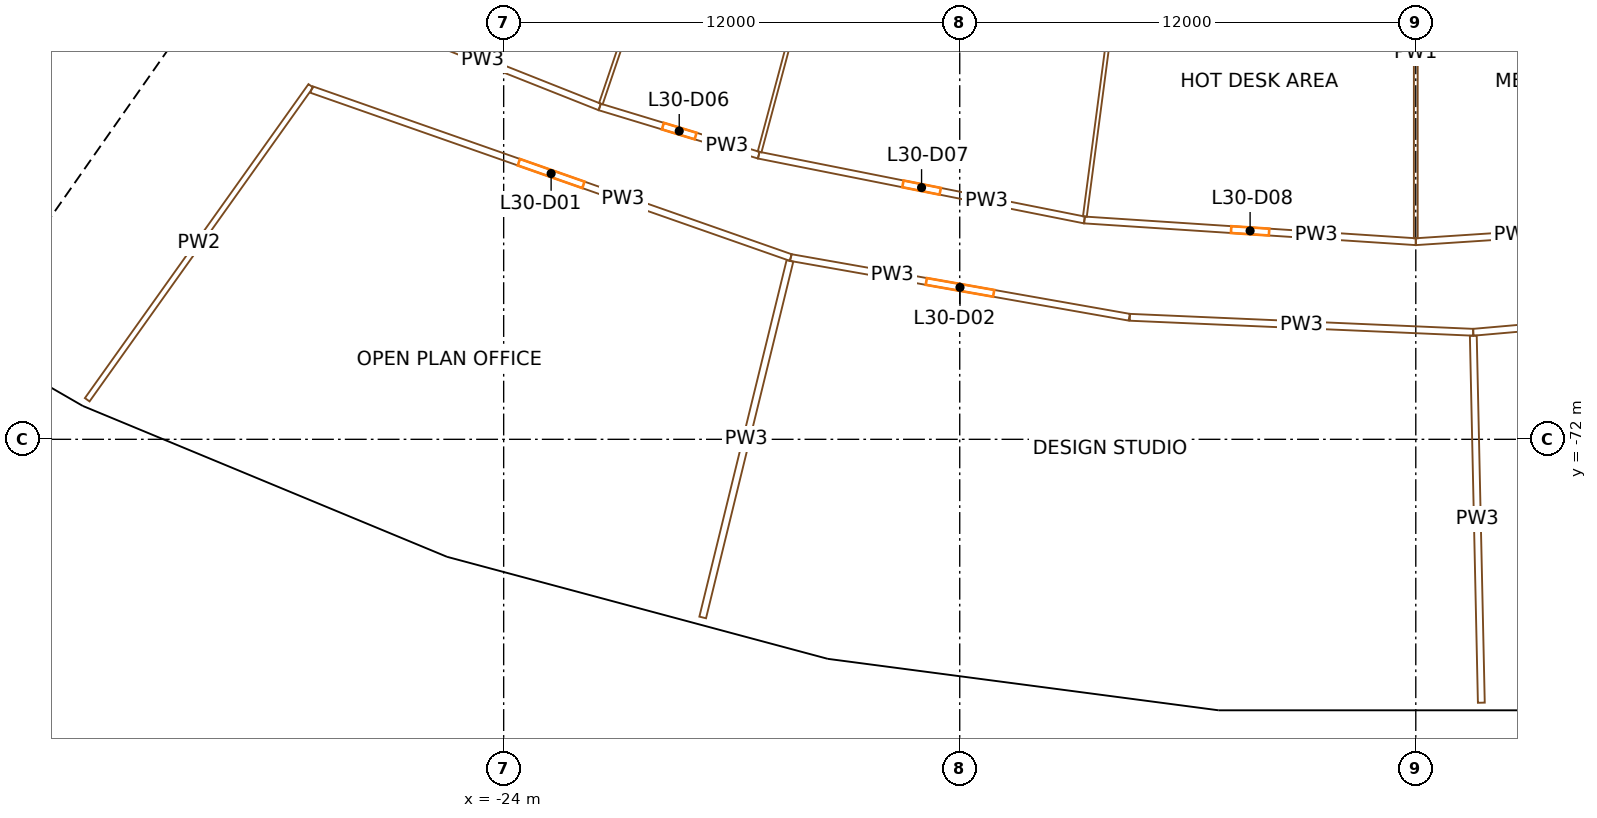
"""IFC4 building model, lengths in metres.
Left out: names, types, materials, properties, quantities, classifications, styles, units other than length and angle.
Written with IfcOpenShell. Run it as: python <this file> out.ifc"""

import sys

from ifc_helpers import new_model, si_unit, direction, frame, frame_2d, origin, origin_2d, place, context, subcontext, project, spatial, rectangle, extrude, element, fill, save


model = new_model("IFC4")
c1 = context("Model", 3, precision=1e-05, world=origin(), true_north=direction((0.0, 1.0)))
c2 = subcontext(c1, "Body", "Model", "MODEL_VIEW")
j1 = project(units=[si_unit("LENGTHUNIT", "METRE"), si_unit("PLANEANGLEUNIT", "RADIAN")], contexts=[c1])
p1 = place(None, origin())
s1 = spatial("IfcSite", under=j1, at=p1, CompositionType="ELEMENT")
p2 = place(p1, origin())
s2 = spatial("IfcBuilding", under=s1, at=p2, CompositionType="ELEMENT")
p3 = place(p2, frame((0.0, 0.0, 132.9)))
s3 = spatial("IfcBuildingStorey", under=s2, at=p3, CompositionType="ELEMENT", Elevation=132.9)
for number, where, z_axis, x_axis in (
    (1, (-34.388, -69.732, 0.0), (0.0, 0.0, 1.0), (0.897, -0.442, 0.0)),
    (2, (-24.992, -73.624, 0.0), (0.0, 0.0, 1.0), (0.947, -0.321, 0.0)),
    (3, (-15.168, -76.256, 0.0), (0.0, 0.0, 1.0), (0.981, -0.195, 0.0)),
    (4, (-5.085, -77.583, 0.0), (0.0, 0.0, 1.0), (0.998, -0.065, 0.0)),
):
    element("IfcColumn", number, at=place(p3, frame(where, z_axis=z_axis, x_axis=x_axis)), inside=s3, PredefinedType="COLUMN", context=c2, shape_type="SweptSolid", body=[
        extrude(rectangle(XDim=1.2, YDim=1.5, at=origin_2d()), origin(), (0.0, 0.0, 1.0), 3.8),
    ])
p4 = place(p3, frame((-36.717, -66.337, 0.0), z_axis=(0.0, 0.0, 1.0), x_axis=(0.573577477574, 0.819151315216, 0.0)))
e5 = element("IfcWall", 5, at=p4, inside=s3, PredefinedType="SHEAR", context=c2, shape_type="SweptSolid", body=[
    extrude(rectangle(XDim=14.8, YDim=0.9, at=frame_2d((7.4, 0.0))), origin(), (0.0, 0.0, 1.0), 3.5),
])
p5 = place(p4, frame((6.2, 0.0, 0.0)))
e6 = element("IfcOpeningElement", 6, at=p5, cuts=e5, PredefinedType="OPENING", context=c2, shape_type="SweptSolid", body=[
    extrude(rectangle(XDim=2.4, YDim=2.1, at=frame_2d((1.2, 1.05))), frame((0.0, 0.46, 0.0), z_axis=(0.0, -1.0, 0.0), x_axis=(1.0, 0.0, 0.0)), (0.0, 0.0, 1.0), 0.92),
])
p6 = place(p3, frame((-35.221, -63.417, 0.0), z_axis=(0.0, 0.0, 1.0), x_axis=(-0.819166993208, 0.573555086491, 0.0)))
e7 = element("IfcWall", 7, at=p6, inside=s3, PredefinedType="SOLIDWALL", context=c2, shape_type="SweptSolid", body=[
    extrude(rectangle(XDim=7.95, YDim=0.3, at=frame_2d((3.975, 0.0))), origin(), (0.0, 0.0, 1.0), 3.5),
])
p7 = place(p3, frame((-29.075, -62.698, 0.0), z_axis=(0.0, 0.0, 1.0), x_axis=(-0.58002146853, -0.814601188339, 0.0)))
e8 = element("IfcWall", 8, at=p7, inside=s3, PredefinedType="PARTITIONING", context=c2, shape_type="SweptSolid", body=[
    extrude(rectangle(XDim=10.141, YDim=0.15, at=frame_2d((5.071, 0.0))), origin(), (0.0, 0.0, 1.0), 2.4),
])
p8 = place(p3, frame((-16.446, -67.217, 0.0), z_axis=(0.0, 0.0, 1.0), x_axis=(-0.943684765834, 0.330845980378, 0.0)))
e9 = element("IfcWall", 9, at=p8, inside=s3, PredefinedType="PARTITIONING", context=c2, shape_type="SweptSolid", body=[
    extrude(rectangle(XDim=13.363, YDim=0.18, at=frame_2d((6.682, 0.0))), origin(), (0.0, 0.0, 1.0), 2.4),
])
p9 = place(p8, frame((5.782, 0.0, 0.0)))
e10 = element("IfcOpeningElement", 10, at=p9, cuts=e9, PredefinedType="OPENING", context=c2, shape_type="SweptSolid", body=[
    extrude(rectangle(XDim=1.8, YDim=2.1, at=frame_2d((0.9, 1.05))), frame((0.0, 0.1, 0.0), z_axis=(0.0, -1.0, 0.0), x_axis=(1.0, 0.0, 0.0)), (0.0, 0.0, 1.0), 0.2),
])
p10 = place(p3, frame((-27.641, -60.809, 0.0), z_axis=(0.0, 0.0, 1.0), x_axis=(0.929586380114, -0.368604343308, 0.0)))
e11 = element("IfcWall", 11, at=p10, inside=s3, PredefinedType="PARTITIONING", context=c2, shape_type="SweptSolid", body=[
    extrude(rectangle(XDim=6.636, YDim=0.18, at=frame_2d((3.318, 0.0))), origin(), (0.0, 0.0, 1.0), 2.4),
])
p11 = place(p3, frame((-21.472, -63.255, 0.0), z_axis=(0.0, 0.0, 1.0), x_axis=(0.956933231095, -0.290308097072, 0.0)))
e12 = element("IfcWall", 12, at=p11, inside=s3, PredefinedType="PARTITIONING", context=c2, shape_type="SweptSolid", body=[
    extrude(rectangle(XDim=4.371, YDim=0.18, at=frame_2d((2.186, 0.0))), origin(), (0.0, 0.0, 1.0), 2.4),
])
p12 = place(p11, frame((1.736, 0.0, 0.0)))
e13 = element("IfcOpeningElement", 13, at=p12, cuts=e12, PredefinedType="OPENING", context=c2, shape_type="SweptSolid", body=[
    extrude(rectangle(XDim=0.9, YDim=2.1, at=frame_2d((0.45, 1.05))), frame((0.0, 0.1, 0.0), z_axis=(0.0, -1.0, 0.0), x_axis=(1.0, 0.0, 0.0)), (0.0, 0.0, 1.0), 0.2),
])
p13 = place(p3, frame((-18.763, -76.687, 0.0), z_axis=(0.0, 0.0, 1.0), x_axis=(0.237667739981, 0.971346511484, 0.0)))
e14 = element("IfcWall", 14, at=p13, inside=s3, PredefinedType="PARTITIONING", context=c2, shape_type="SweptSolid", body=[
    extrude(rectangle(XDim=9.659, YDim=0.18, at=frame_2d((4.83, 0.0))), origin(), (0.0, 0.0, 1.0), 2.4),
])
p14 = place(p3, frame((-18.354, -54.07, 0.0), z_axis=(0.0, 0.0, 1.0), x_axis=(-0.321428562801, -0.946933830326, 0.0)))
e15 = element("IfcWall", 15, at=p14, inside=s3, PredefinedType="PARTITIONING", context=c2, shape_type="SweptSolid", body=[
    extrude(rectangle(XDim=9.61, YDim=0.1, at=frame_2d((4.805, 0.0))), origin(), (0.0, 0.0, 1.0), 2.4),
])
p15 = place(p3, frame((-17.289, -64.524, 0.0), z_axis=(0.0, 0.0, 1.0), x_axis=(0.980786466832, -0.195084357342, 0.0)))
e16 = element("IfcWall", 16, at=p15, inside=s3, PredefinedType="PARTITIONING", context=c2, shape_type="SweptSolid", body=[
    extrude(rectangle(XDim=8.738, YDim=0.18, at=frame_2d((4.369, 0.0))), origin(), (0.0, 0.0, 1.0), 2.4),
])
p16 = place(p15, frame((3.869, 0.0, 0.0)))
e17 = element("IfcOpeningElement", 17, at=p16, cuts=e16, PredefinedType="OPENING", context=c2, shape_type="SweptSolid", body=[
    extrude(rectangle(XDim=1.0, YDim=2.1, at=frame_2d((0.5, 1.05))), frame((0.0, 0.1, 0.0), z_axis=(0.0, -1.0, 0.0), x_axis=(1.0, 0.0, 0.0)), (0.0, 0.0, 1.0), 0.2),
])
p17 = place(p3, frame((-7.541, -68.787, 0.0), z_axis=(0.0, 0.0, 1.0), x_axis=(-0.984811812319, 0.173625154619, 0.0)))
e18 = element("IfcWall", 18, at=p17, inside=s3, PredefinedType="PARTITIONING", context=c2, shape_type="SweptSolid", body=[
    extrude(rectangle(XDim=9.043, YDim=0.18, at=frame_2d((4.521, 0.0))), origin(), (0.0, 0.0, 1.0), 2.4),
])
p18 = place(p17, frame((3.621, 0.0, 0.0)))
e19 = element("IfcOpeningElement", 19, at=p18, cuts=e18, PredefinedType="OPENING", context=c2, shape_type="SweptSolid", body=[
    extrude(rectangle(XDim=1.8, YDim=2.1, at=frame_2d((0.9, 1.05))), frame((0.0, 0.1, 0.0), z_axis=(0.0, -1.0, 0.0), x_axis=(1.0, 0.0, 0.0)), (0.0, 0.0, 1.0), 0.2),
])
p19 = place(p3, frame((-14.747, -55.037, 0.0), z_axis=(0.0, 0.0, 1.0), x_axis=(-0.258828880572, -0.965923190829, 0.0)))
e20 = element("IfcWall", 20, at=p19, inside=s3, PredefinedType="PARTITIONING", context=c2, shape_type="SweptSolid", body=[
    extrude(rectangle(XDim=9.731, YDim=0.1, at=frame_2d((4.866, 0.0))), origin(), (0.0, 0.0, 1.0), 2.4),
])
p20 = place(p3, frame((-8.719, -66.229, 0.0), z_axis=(0.0, 0.0, 1.0), x_axis=(0.997858593599, -0.065408158359, 0.0)))
e21 = element("IfcWall", 21, at=p20, inside=s3, PredefinedType="PARTITIONING", context=c2, shape_type="SweptSolid", body=[
    extrude(rectangle(XDim=8.738, YDim=0.18, at=frame_2d((4.369, 0.0))), origin(), (0.0, 0.0, 1.0), 2.4),
])
p21 = place(p20, frame((3.869, 0.0, 0.0)))
e22 = element("IfcOpeningElement", 22, at=p21, cuts=e21, PredefinedType="OPENING", context=c2, shape_type="SweptSolid", body=[
    extrude(rectangle(XDim=1.0, YDim=2.1, at=frame_2d((0.5, 1.05))), frame((0.0, 0.1, 0.0), z_axis=(0.0, -1.0, 0.0), x_axis=(1.0, 0.0, 0.0)), (0.0, 0.0, 1.0), 0.2),
])
p22 = place(p3, frame((-7.523, -68.789, 0.0), z_axis=(0.0, 0.0, 1.0), x_axis=(0.999048962102, -0.043602423354, 0.0)))
e23 = element("IfcWall", 23, at=p22, inside=s3, PredefinedType="PARTITIONING", context=c2, shape_type="SweptSolid", body=[
    extrude(rectangle(XDim=9.043, YDim=0.18, at=frame_2d((4.521, 0.0))), origin(), (0.0, 0.0, 1.0), 2.4),
])
p23 = place(p3, frame((-7.437, -56.491, 0.0), z_axis=(0.0, 0.0, 1.0), x_axis=(-0.130531739513, -0.991444131043, 0.0)))
e24 = element("IfcWall", 24, at=p23, inside=s3, PredefinedType="PARTITIONING", context=c2, shape_type="SweptSolid", body=[
    extrude(rectangle(XDim=9.731, YDim=0.1, at=frame_2d((4.866, 0.0))), origin(), (0.0, 0.0, 1.0), 2.4),
])
p24 = place(p3, frame((0.0, -66.8, 0.0), z_axis=(0.0, 0.0, 1.0), x_axis=(0.997858593599, 0.065408158359, 0.0)))
e25 = element("IfcWall", 25, at=p24, inside=s3, PredefinedType="PARTITIONING", context=c2, shape_type="SweptSolid", body=[
    extrude(rectangle(XDim=8.738, YDim=0.18, at=frame_2d((4.369, 0.0))), origin(), (0.0, 0.0, 1.0), 2.4),
])
p25 = place(p24, frame((3.869, 0.0, 0.0)))
e26 = element("IfcOpeningElement", 26, at=p25, cuts=e25, PredefinedType="OPENING", context=c2, shape_type="SweptSolid", body=[
    extrude(rectangle(XDim=1.0, YDim=2.1, at=frame_2d((0.5, 1.05))), frame((0.0, 0.1, 0.0), z_axis=(0.0, -1.0, 0.0), x_axis=(1.0, 0.0, 0.0)), (0.0, 0.0, 1.0), 0.2),
])
p26 = place(p3, frame((0.0, -56.979, 0.0), z_axis=(0.0, 0.0, 1.0), x_axis=(0.0, -1.0, 0.0)))
e27 = element("IfcWall", 27, at=p26, inside=s3, PredefinedType="PARTITIONING", context=c2, shape_type="SweptSolid", body=[
    extrude(rectangle(XDim=9.731, YDim=0.1, at=frame_2d((4.866, 0.0))), origin(), (0.0, 0.0, 1.0), 2.4),
])
p27 = place(p3, frame((10.529, -68.394, 0.0), z_axis=(0.0, 0.0, 1.0), x_axis=(-0.996190935779, -0.087198735491, 0.0)))
e28 = element("IfcWall", 28, at=p27, inside=s3, PredefinedType="PARTITIONING", context=c2, shape_type="SweptSolid", body=[
    extrude(rectangle(XDim=9.052, YDim=0.18, at=frame_2d((4.526, 0.0))), origin(), (0.0, 0.0, 1.0), 2.4),
])
p28 = place(p27, frame((4.026, 0.0, 0.0)))
e29 = element("IfcOpeningElement", 29, at=p28, cuts=e28, PredefinedType="OPENING", context=c2, shape_type="SweptSolid", body=[
    extrude(rectangle(XDim=1.0, YDim=2.1, at=frame_2d((0.5, 1.05))), frame((0.0, 0.1, 0.0), z_axis=(0.0, -1.0, 0.0), x_axis=(1.0, 0.0, 0.0)), (0.0, 0.0, 1.0), 0.2),
])
p29 = place(p3, frame((1.724, -78.93, 0.0), z_axis=(0.0, 0.0, 1.0), x_axis=(-0.021838346282, 0.999761514878, 0.0)))
e30 = element("IfcWall", 30, at=p29, inside=s3, PredefinedType="PARTITIONING", context=c2, shape_type="SweptSolid", body=[
    extrude(rectangle(XDim=9.659, YDim=0.18, at=frame_2d((4.83, 0.0))), origin(), (0.0, 0.0, 1.0), 2.4),
])
p30 = place(p9, origin())
e31 = element("IfcDoor", 31, at=p30, inside=s3, OperationType="DOUBLE_DOOR_SINGLE_SWING", PredefinedType="DOOR", context=c2, shape_type="SweptSolid", body=[
    extrude(rectangle(XDim=1.8, YDim=2.1, at=frame_2d((0.9, 1.05))), frame((0.0, 0.025, 0.0), z_axis=(0.0, -1.0, 0.0), x_axis=(1.0, 0.0, 0.0)), (0.0, 0.0, 1.0), 0.05),
])
fill(e10, e31)
p31 = place(p18, origin())
e32 = element("IfcDoor", 32, at=p31, inside=s3, OperationType="DOUBLE_DOOR_SINGLE_SWING", PredefinedType="DOOR", context=c2, shape_type="SweptSolid", body=[
    extrude(rectangle(XDim=1.8, YDim=2.1, at=frame_2d((0.9, 1.05))), frame((0.0, 0.025, 0.0), z_axis=(0.0, -1.0, 0.0), x_axis=(1.0, 0.0, 0.0)), (0.0, 0.0, 1.0), 0.05),
])
fill(e19, e32)
p32 = place(p12, origin())
e33 = element("IfcDoor", 33, at=p32, inside=s3, OperationType="SINGLE_SWING_RIGHT", PredefinedType="DOOR", context=c2, shape_type="SweptSolid", body=[
    extrude(rectangle(XDim=0.9, YDim=2.1, at=frame_2d((0.45, 1.05))), frame((0.0, 0.025, 0.0), z_axis=(0.0, -1.0, 0.0), x_axis=(1.0, 0.0, 0.0)), (0.0, 0.0, 1.0), 0.05),
])
fill(e13, e33)
p33 = place(p16, origin())
e34 = element("IfcDoor", 34, at=p33, inside=s3, OperationType="SINGLE_SWING_RIGHT", PredefinedType="DOOR", context=c2, shape_type="SweptSolid", body=[
    extrude(rectangle(XDim=1.0, YDim=2.1, at=frame_2d((0.5, 1.05))), frame((0.0, 0.025, 0.0), z_axis=(0.0, -1.0, 0.0), x_axis=(1.0, 0.0, 0.0)), (0.0, 0.0, 1.0), 0.05),
])
fill(e17, e34)
p34 = place(p21, origin())
e35 = element("IfcDoor", 35, at=p34, inside=s3, OperationType="SINGLE_SWING_RIGHT", PredefinedType="DOOR", context=c2, shape_type="SweptSolid", body=[
    extrude(rectangle(XDim=1.0, YDim=2.1, at=frame_2d((0.5, 1.05))), frame((0.0, 0.025, 0.0), z_axis=(0.0, -1.0, 0.0), x_axis=(1.0, 0.0, 0.0)), (0.0, 0.0, 1.0), 0.05),
])
fill(e22, e35)
save(model, sys.argv[1])
